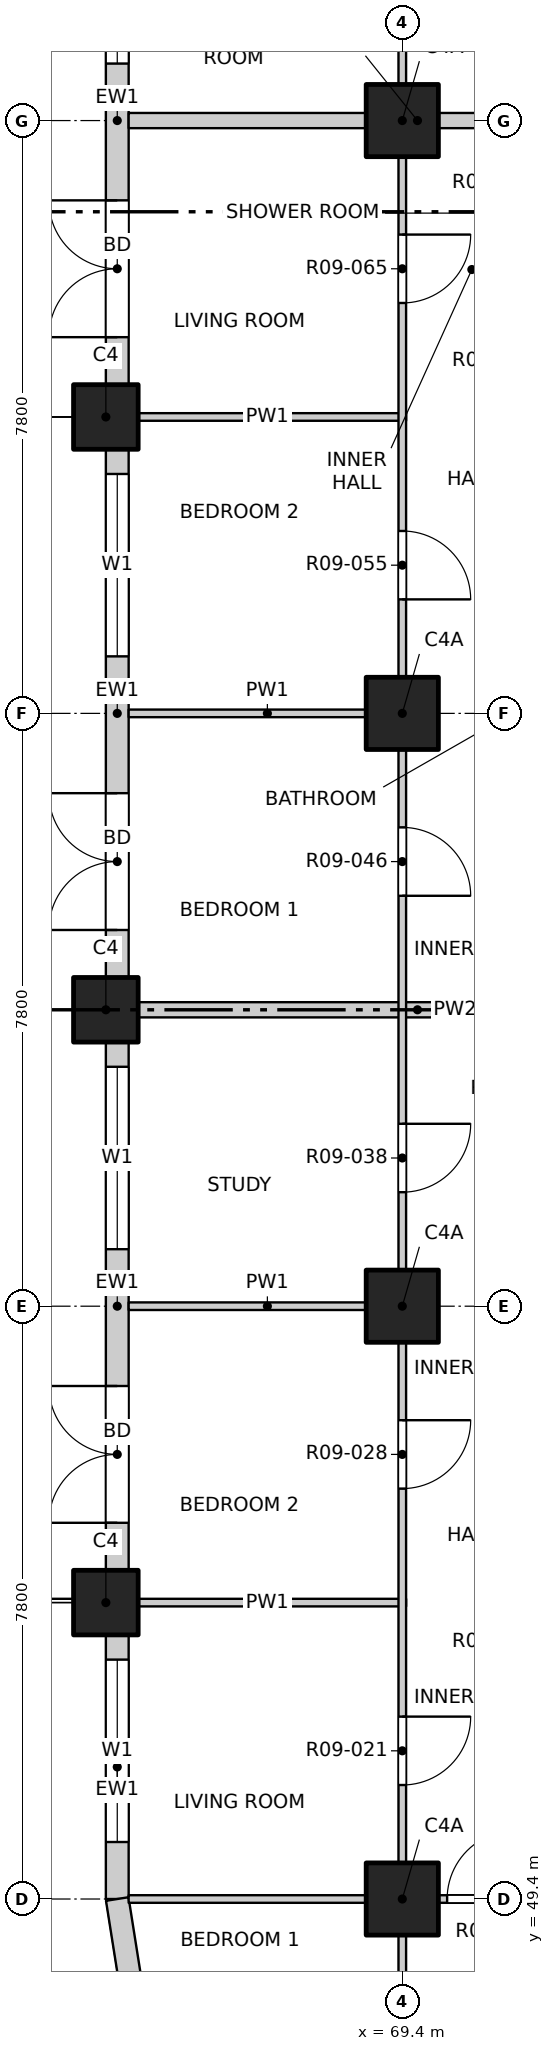
"""IFC4 building model, lengths in metres.
Left out: names, types, materials, properties, quantities, classifications, styles, units other than length and angle.
Written with IfcOpenShell. Run it as: python <this file> out.ifc"""

import sys

from ifc_helpers import new_model, si_unit, direction, frame, frame_2d, origin, origin_2d, place, context, subcontext, project, spatial, rectangle, extrude, element, fill, save


model = new_model("IFC4")
c1 = context("Model", 3, precision=1e-05, world=origin(), true_north=direction((0.0, 1.0)))
c2 = subcontext(c1, "Body", "Model", "MODEL_VIEW")
j1 = project(units=[si_unit("LENGTHUNIT", "METRE"), si_unit("PLANEANGLEUNIT", "RADIAN")], contexts=[c1])
p1 = place(None, origin())
s1 = spatial("IfcSite", under=j1, at=p1, CompositionType="ELEMENT")
p2 = place(p1, origin())
s2 = spatial("IfcBuilding", under=s1, at=p2, CompositionType="ELEMENT")
p3 = place(p2, frame((0.0, 0.0, 110.1)))
s3 = spatial("IfcBuildingStorey", under=s2, at=p3, CompositionType="ELEMENT", Elevation=110.1)
for number, where, z_axis, x_axis in (
    (1, (65.5, 53.3, -0.25), (0.0, 0.0, 1.0), (1.0, 0.0, 0.0)),
    (2, (65.5, 61.1, -0.25), (0.0, 0.0, 1.0), (1.0, 0.0, 0.0)),
    (3, (65.5, 68.9, -0.25), (0.0, 0.0, 1.0), (1.0, 0.0, 0.0)),
):
    element("IfcColumn", number, at=place(p3, frame(where, z_axis=z_axis, x_axis=x_axis)), inside=s3, PredefinedType="COLUMN", context=c2, shape_type="SweptSolid", body=[
        extrude(rectangle(XDim=0.85, YDim=0.85, at=origin_2d()), origin(), (0.0, 0.0, 1.0), 3.4),
    ])
for number, where, z_axis, x_axis in (
    (4, (69.4, 49.4, -0.25), (0.0, 0.0, 1.0), (1.0, 0.0, 0.0)),
    (5, (69.4, 57.2, -0.25), (0.0, 0.0, 1.0), (1.0, 0.0, 0.0)),
    (6, (69.4, 65.0, -0.25), (0.0, 0.0, 1.0), (1.0, 0.0, 0.0)),
    (7, (69.4, 72.8, -0.25), (0.0, 0.0, 1.0), (1.0, 0.0, 0.0)),
):
    element("IfcColumn", number, at=place(p3, frame(where, z_axis=z_axis, x_axis=x_axis)), inside=s3, PredefinedType="COLUMN", context=c2, shape_type="SweptSolid", body=[
        extrude(rectangle(XDim=0.95, YDim=0.95, at=origin_2d()), origin(), (0.0, 0.0, 1.0), 3.4),
    ])
p4 = place(p3, frame((65.65, 49.4, 0.0), z_axis=(0.0, 0.0, 1.0), x_axis=(0.0, 1.0, 0.0)))
e8 = element("IfcWall", 8, at=p4, inside=s3, PredefinedType="SOLIDWALL", context=c2, shape_type="SweptSolid", body=[
    extrude(rectangle(XDim=3.475, YDim=0.3, at=frame_2d((1.738, 0.0))), origin(), (0.0, 0.0, 1.0), 2.7),
])
p5 = place(p4, frame((0.75, 0.0, 0.9)))
e9 = element("IfcOpeningElement", 9, at=p5, cuts=e8, PredefinedType="OPENING", context=c2, shape_type="SweptSolid", body=[
    extrude(rectangle(XDim=2.4, YDim=1.8, at=frame_2d((1.2, 0.9))), frame((0.0, 0.16, 0.0), z_axis=(0.0, -1.0, 0.0), x_axis=(1.0, 0.0, 0.0)), (0.0, 0.0, 1.0), 0.32),
])
p6 = place(p3, frame((65.65, 53.725, 0.0), z_axis=(0.0, 0.0, 1.0), x_axis=(0.0, 1.0, 0.0)))
e10 = element("IfcWall", 10, at=p6, inside=s3, PredefinedType="SOLIDWALL", context=c2, shape_type="SweptSolid", body=[
    extrude(rectangle(XDim=6.95, YDim=0.3, at=frame_2d((3.475, 0.0))), origin(), (0.0, 0.0, 1.0), 2.7),
])
p7 = place(p6, frame((0.625, 0.0, 0.0)))
e11 = element("IfcOpeningElement", 11, at=p7, cuts=e10, PredefinedType="OPENING", context=c2, shape_type="SweptSolid", body=[
    extrude(rectangle(XDim=1.8, YDim=2.4, at=frame_2d((0.9, 1.2))), frame((0.0, 0.16, 0.0), z_axis=(0.0, -1.0, 0.0), x_axis=(1.0, 0.0, 0.0)), (0.0, 0.0, 1.0), 0.32),
])
p8 = place(p6, frame((4.225, 0.0, 0.9)))
e12 = element("IfcOpeningElement", 12, at=p8, cuts=e10, PredefinedType="OPENING", context=c2, shape_type="SweptSolid", body=[
    extrude(rectangle(XDim=2.4, YDim=1.8, at=frame_2d((1.2, 0.9))), frame((0.0, 0.16, 0.0), z_axis=(0.0, -1.0, 0.0), x_axis=(1.0, 0.0, 0.0)), (0.0, 0.0, 1.0), 0.32),
])
p9 = place(p3, frame((65.65, 61.525, 0.0), z_axis=(0.0, 0.0, 1.0), x_axis=(0.0, 1.0, 0.0)))
e13 = element("IfcWall", 13, at=p9, inside=s3, PredefinedType="SOLIDWALL", context=c2, shape_type="SweptSolid", body=[
    extrude(rectangle(XDim=6.95, YDim=0.3, at=frame_2d((3.475, 0.0))), origin(), (0.0, 0.0, 1.0), 2.7),
])
p10 = place(p9, frame((0.625, 0.0, 0.0)))
e14 = element("IfcOpeningElement", 14, at=p10, cuts=e13, PredefinedType="OPENING", context=c2, shape_type="SweptSolid", body=[
    extrude(rectangle(XDim=1.8, YDim=2.4, at=frame_2d((0.9, 1.2))), frame((0.0, 0.16, 0.0), z_axis=(0.0, -1.0, 0.0), x_axis=(1.0, 0.0, 0.0)), (0.0, 0.0, 1.0), 0.32),
])
p11 = place(p9, frame((4.225, 0.0, 0.9)))
e15 = element("IfcOpeningElement", 15, at=p11, cuts=e13, PredefinedType="OPENING", context=c2, shape_type="SweptSolid", body=[
    extrude(rectangle(XDim=2.4, YDim=1.8, at=frame_2d((1.2, 0.9))), frame((0.0, 0.16, 0.0), z_axis=(0.0, -1.0, 0.0), x_axis=(1.0, 0.0, 0.0)), (0.0, 0.0, 1.0), 0.32),
])
p12 = place(p3, frame((65.65, 69.325, 0.0), z_axis=(0.0, 0.0, 1.0), x_axis=(0.0, 1.0, 0.0)))
e16 = element("IfcWall", 16, at=p12, inside=s3, PredefinedType="SOLIDWALL", context=c2, shape_type="SweptSolid", body=[
    extrude(rectangle(XDim=6.95, YDim=0.3, at=frame_2d((3.475, 0.0))), origin(), (0.0, 0.0, 1.0), 2.7),
])
p13 = place(p12, frame((0.625, 0.0, 0.0)))
e17 = element("IfcOpeningElement", 17, at=p13, cuts=e16, PredefinedType="OPENING", context=c2, shape_type="SweptSolid", body=[
    extrude(rectangle(XDim=1.8, YDim=2.4, at=frame_2d((0.9, 1.2))), frame((0.0, 0.16, 0.0), z_axis=(0.0, -1.0, 0.0), x_axis=(1.0, 0.0, 0.0)), (0.0, 0.0, 1.0), 0.32),
])
p14 = place(p12, frame((4.225, 0.0, 0.9)))
e18 = element("IfcOpeningElement", 18, at=p14, cuts=e16, PredefinedType="OPENING", context=c2, shape_type="SweptSolid", body=[
    extrude(rectangle(XDim=2.4, YDim=1.8, at=frame_2d((1.2, 0.9))), frame((0.0, 0.16, 0.0), z_axis=(0.0, -1.0, 0.0), x_axis=(1.0, 0.0, 0.0)), (0.0, 0.0, 1.0), 0.32),
])
p15 = place(p3, frame((65.65, 49.4, 0.0), z_axis=(0.0, 0.0, 1.0), x_axis=(0.156496880861, -0.987678452879, 0.0)))
e19 = element("IfcWall", 19, at=p15, inside=s3, PredefinedType="SOLIDWALL", context=c2, shape_type="SweptSolid", body=[
    extrude(rectangle(XDim=1.173, YDim=0.3, at=frame_2d((0.586, 0.0))), origin(), (0.0, 0.0, 1.0), 2.7),
])
p16 = place(p3, frame((65.8, 49.4, 0.0), z_axis=(0.0, 0.0, 1.0), x_axis=(1.0, 0.0, 0.0)))
e20 = element("IfcWall", 20, at=p16, inside=s3, PredefinedType="PARTITIONING", context=c2, shape_type="SweptSolid", body=[
    extrude(rectangle(XDim=38.4, YDim=0.1, at=frame_2d((19.2, 0.0))), origin(), (0.0, 0.0, 1.0), 3.15),
])
p17 = place(p16, frame((4.19, 0.0, 0.0)))
e21 = element("IfcOpeningElement", 21, at=p17, cuts=e20, PredefinedType="OPENING", context=c2, shape_type="SweptSolid", body=[
    extrude(rectangle(XDim=0.9, YDim=2.1, at=frame_2d((0.45, 1.05))), frame((0.0, 0.06, 0.0), z_axis=(0.0, -1.0, 0.0), x_axis=(1.0, 0.0, 0.0)), (0.0, 0.0, 1.0), 0.12),
])
p18 = place(p16, frame((9.0, 0.0, 0.0)))
e22 = element("IfcOpeningElement", 22, at=p18, cuts=e20, PredefinedType="OPENING", context=c2, shape_type="SweptSolid", body=[
    extrude(rectangle(XDim=0.9, YDim=2.1, at=frame_2d((0.45, 1.05))), frame((0.0, 0.06, 0.0), z_axis=(0.0, -1.0, 0.0), x_axis=(1.0, 0.0, 0.0)), (0.0, 0.0, 1.0), 0.12),
])
p19 = place(p16, frame((12.9, 0.0, 0.0)))
e23 = element("IfcOpeningElement", 23, at=p19, cuts=e20, PredefinedType="OPENING", context=c2, shape_type="SweptSolid", body=[
    extrude(rectangle(XDim=0.9, YDim=2.1, at=frame_2d((0.45, 1.05))), frame((0.0, 0.06, 0.0), z_axis=(0.0, -1.0, 0.0), x_axis=(1.0, 0.0, 0.0)), (0.0, 0.0, 1.0), 0.12),
])
p20 = place(p16, frame((16.8, 0.0, 0.0)))
e24 = element("IfcOpeningElement", 24, at=p20, cuts=e20, PredefinedType="OPENING", context=c2, shape_type="SweptSolid", body=[
    extrude(rectangle(XDim=0.9, YDim=2.1, at=frame_2d((0.45, 1.05))), frame((0.0, 0.06, 0.0), z_axis=(0.0, -1.0, 0.0), x_axis=(1.0, 0.0, 0.0)), (0.0, 0.0, 1.0), 0.12),
])
p21 = place(p16, frame((20.7, 0.0, 0.0)))
e25 = element("IfcOpeningElement", 25, at=p21, cuts=e20, PredefinedType="OPENING", context=c2, shape_type="SweptSolid", body=[
    extrude(rectangle(XDim=0.9, YDim=2.1, at=frame_2d((0.45, 1.05))), frame((0.0, 0.06, 0.0), z_axis=(0.0, -1.0, 0.0), x_axis=(1.0, 0.0, 0.0)), (0.0, 0.0, 1.0), 0.12),
])
p22 = place(p16, frame((24.6, 0.0, 0.0)))
e26 = element("IfcOpeningElement", 26, at=p22, cuts=e20, PredefinedType="OPENING", context=c2, shape_type="SweptSolid", body=[
    extrude(rectangle(XDim=0.9, YDim=2.1, at=frame_2d((0.45, 1.05))), frame((0.0, 0.06, 0.0), z_axis=(0.0, -1.0, 0.0), x_axis=(1.0, 0.0, 0.0)), (0.0, 0.0, 1.0), 0.12),
])
p23 = place(p16, frame((28.5, 0.0, 0.0)))
e27 = element("IfcOpeningElement", 27, at=p23, cuts=e20, PredefinedType="OPENING", context=c2, shape_type="SweptSolid", body=[
    extrude(rectangle(XDim=0.9, YDim=2.1, at=frame_2d((0.45, 1.05))), frame((0.0, 0.06, 0.0), z_axis=(0.0, -1.0, 0.0), x_axis=(1.0, 0.0, 0.0)), (0.0, 0.0, 1.0), 0.12),
])
p24 = place(p16, frame((33.31, 0.0, 0.0)))
e28 = element("IfcOpeningElement", 28, at=p24, cuts=e20, PredefinedType="OPENING", context=c2, shape_type="SweptSolid", body=[
    extrude(rectangle(XDim=0.9, YDim=2.1, at=frame_2d((0.45, 1.05))), frame((0.0, 0.06, 0.0), z_axis=(0.0, -1.0, 0.0), x_axis=(1.0, 0.0, 0.0)), (0.0, 0.0, 1.0), 0.12),
])
for number, where, z_axis, x_axis in (
    (29, (65.8, 53.3, 0.0), (0.0, 0.0, 1.0), (1.0, 0.0, 0.0)),
    (30, (65.8, 57.2, 0.0), (0.0, 0.0, 1.0), (1.0, 0.0, 0.0)),
):
    element("IfcWall", number, at=place(p3, frame(where, z_axis=z_axis, x_axis=x_axis)), inside=s3, PredefinedType="PARTITIONING", context=c2, shape_type="SweptSolid", body=[
        extrude(rectangle(XDim=3.65, YDim=0.1, at=frame_2d((1.825, 0.0))), origin(), (0.0, 0.0, 1.0), 3.15),
    ])
p25 = place(p3, frame((65.8, 61.1, 0.0), z_axis=(0.0, 0.0, 1.0), x_axis=(1.0, 0.0, 0.0)))
e31 = element("IfcWall", 31, at=p25, inside=s3, PredefinedType="PARTITIONING", context=c2, shape_type="SweptSolid", body=[
    extrude(rectangle(XDim=7.6, YDim=0.2, at=frame_2d((3.8, 0.0))), origin(), (0.0, 0.0, 1.0), 2.55),
])
p26 = place(p3, frame((65.8, 65.0, 0.0), z_axis=(0.0, 0.0, 1.0), x_axis=(1.0, 0.0, 0.0)))
e32 = element("IfcWall", 32, at=p26, inside=s3, PredefinedType="PARTITIONING", context=c2, shape_type="SweptSolid", body=[
    extrude(rectangle(XDim=3.65, YDim=0.1, at=frame_2d((1.825, 0.0))), origin(), (0.0, 0.0, 1.0), 3.15),
])
p27 = place(p3, frame((65.8, 68.9, 0.0), z_axis=(0.0, 0.0, 1.0), x_axis=(1.0, 0.0, 0.0)))
e33 = element("IfcWall", 33, at=p27, inside=s3, PredefinedType="PARTITIONING", context=c2, shape_type="SweptSolid", body=[
    extrude(rectangle(XDim=3.65, YDim=0.1, at=frame_2d((1.825, 0.0))), origin(), (0.0, 0.0, 1.0), 2.55),
])
p28 = place(p3, frame((65.8, 72.8, 0.0), z_axis=(0.0, 0.0, 1.0), x_axis=(1.0, 0.0, 0.0)))
e34 = element("IfcWall", 34, at=p28, inside=s3, PredefinedType="PARTITIONING", context=c2, shape_type="SweptSolid", body=[
    extrude(rectangle(XDim=7.6, YDim=0.2, at=frame_2d((3.8, 0.0))), origin(), (0.0, 0.0, 1.0), 3.15),
])
p29 = place(p3, frame((69.4, 45.8, 0.0), z_axis=(0.0, 0.0, 1.0), x_axis=(0.0, 1.0, 0.0)))
e35 = element("IfcWall", 35, at=p29, inside=s3, PredefinedType="PARTITIONING", context=c2, shape_type="SweptSolid", body=[
    extrude(rectangle(XDim=38.4, YDim=0.1, at=frame_2d((19.2, 0.0))), origin(), (0.0, 0.0, 1.0), 3.15),
])
p30 = place(p29, frame((1.05, 0.0, 0.0)))
e36 = element("IfcOpeningElement", 36, at=p30, cuts=e35, PredefinedType="OPENING", context=c2, shape_type="SweptSolid", body=[
    extrude(rectangle(XDim=1.2, YDim=2.1, at=frame_2d((0.6, 1.05))), frame((0.0, 0.06, 0.0), z_axis=(0.0, -1.0, 0.0), x_axis=(1.0, 0.0, 0.0)), (0.0, 0.0, 1.0), 0.12),
])
p31 = place(p29, frame((5.1, 0.0, 0.0)))
e37 = element("IfcOpeningElement", 37, at=p31, cuts=e35, PredefinedType="OPENING", context=c2, shape_type="SweptSolid", body=[
    extrude(rectangle(XDim=0.9, YDim=2.1, at=frame_2d((0.45, 1.05))), frame((0.0, 0.06, 0.0), z_axis=(0.0, -1.0, 0.0), x_axis=(1.0, 0.0, 0.0)), (0.0, 0.0, 1.0), 0.12),
])
p32 = place(p29, frame((9.0, 0.0, 0.0)))
e38 = element("IfcOpeningElement", 38, at=p32, cuts=e35, PredefinedType="OPENING", context=c2, shape_type="SweptSolid", body=[
    extrude(rectangle(XDim=0.9, YDim=2.1, at=frame_2d((0.45, 1.05))), frame((0.0, 0.06, 0.0), z_axis=(0.0, -1.0, 0.0), x_axis=(1.0, 0.0, 0.0)), (0.0, 0.0, 1.0), 0.12),
])
p33 = place(p29, frame((12.9, 0.0, 0.0)))
e39 = element("IfcOpeningElement", 39, at=p33, cuts=e35, PredefinedType="OPENING", context=c2, shape_type="SweptSolid", body=[
    extrude(rectangle(XDim=0.9, YDim=2.1, at=frame_2d((0.45, 1.05))), frame((0.0, 0.06, 0.0), z_axis=(0.0, -1.0, 0.0), x_axis=(1.0, 0.0, 0.0)), (0.0, 0.0, 1.0), 0.12),
])
p34 = place(p29, frame((16.8, 0.0, 0.0)))
e40 = element("IfcOpeningElement", 40, at=p34, cuts=e35, PredefinedType="OPENING", context=c2, shape_type="SweptSolid", body=[
    extrude(rectangle(XDim=0.9, YDim=2.1, at=frame_2d((0.45, 1.05))), frame((0.0, 0.06, 0.0), z_axis=(0.0, -1.0, 0.0), x_axis=(1.0, 0.0, 0.0)), (0.0, 0.0, 1.0), 0.12),
])
p35 = place(p29, frame((20.7, 0.0, 0.0)))
e41 = element("IfcOpeningElement", 41, at=p35, cuts=e35, PredefinedType="OPENING", context=c2, shape_type="SweptSolid", body=[
    extrude(rectangle(XDim=0.9, YDim=2.1, at=frame_2d((0.45, 1.05))), frame((0.0, 0.06, 0.0), z_axis=(0.0, -1.0, 0.0), x_axis=(1.0, 0.0, 0.0)), (0.0, 0.0, 1.0), 0.12),
])
p36 = place(p29, frame((24.6, 0.0, 0.0)))
e42 = element("IfcOpeningElement", 42, at=p36, cuts=e35, PredefinedType="OPENING", context=c2, shape_type="SweptSolid", body=[
    extrude(rectangle(XDim=0.9, YDim=2.1, at=frame_2d((0.45, 1.05))), frame((0.0, 0.06, 0.0), z_axis=(0.0, -1.0, 0.0), x_axis=(1.0, 0.0, 0.0)), (0.0, 0.0, 1.0), 0.12),
])
p37 = place(p29, frame((28.5, 0.0, 0.0)))
e43 = element("IfcOpeningElement", 43, at=p37, cuts=e35, PredefinedType="OPENING", context=c2, shape_type="SweptSolid", body=[
    extrude(rectangle(XDim=0.9, YDim=2.1, at=frame_2d((0.45, 1.05))), frame((0.0, 0.06, 0.0), z_axis=(0.0, -1.0, 0.0), x_axis=(1.0, 0.0, 0.0)), (0.0, 0.0, 1.0), 0.12),
])
p38 = place(p29, frame((32.4, 0.0, 0.0)))
e44 = element("IfcOpeningElement", 44, at=p38, cuts=e35, PredefinedType="OPENING", context=c2, shape_type="SweptSolid", body=[
    extrude(rectangle(XDim=0.9, YDim=2.1, at=frame_2d((0.45, 1.05))), frame((0.0, 0.06, 0.0), z_axis=(0.0, -1.0, 0.0), x_axis=(1.0, 0.0, 0.0)), (0.0, 0.0, 1.0), 0.12),
])
p39 = place(p29, frame((36.15, 0.0, 0.0)))
e45 = element("IfcOpeningElement", 45, at=p39, cuts=e35, PredefinedType="OPENING", context=c2, shape_type="SweptSolid", body=[
    extrude(rectangle(XDim=1.2, YDim=2.1, at=frame_2d((0.6, 1.05))), frame((0.0, 0.06, 0.0), z_axis=(0.0, -1.0, 0.0), x_axis=(1.0, 0.0, 0.0)), (0.0, 0.0, 1.0), 0.12),
])
p40 = place(p5, origin())
e46 = element("IfcWindow", 46, at=p40, inside=s3, PartitioningType="DOUBLE_PANEL_VERTICAL", PredefinedType="WINDOW", context=c2, shape_type="SweptSolid", body=[
    extrude(rectangle(XDim=2.4, YDim=1.8, at=frame_2d((1.2, 0.9))), frame((0.0, 0.03, 0.0), z_axis=(0.0, -1.0, 0.0), x_axis=(1.0, 0.0, 0.0)), (0.0, 0.0, 1.0), 0.06),
])
fill(e9, e46)
p41 = place(p7, origin())
e47 = element("IfcDoor", 47, at=p41, inside=s3, OperationType="DOUBLE_DOOR_SINGLE_SWING", PredefinedType="DOOR", context=c2, shape_type="SweptSolid", body=[
    extrude(rectangle(XDim=1.8, YDim=2.4, at=frame_2d((0.9, 1.2))), frame((0.0, 0.025, 0.0), z_axis=(0.0, -1.0, 0.0), x_axis=(1.0, 0.0, 0.0)), (0.0, 0.0, 1.0), 0.05),
])
fill(e11, e47)
p42 = place(p8, origin())
e48 = element("IfcWindow", 48, at=p42, inside=s3, PartitioningType="DOUBLE_PANEL_VERTICAL", PredefinedType="WINDOW", context=c2, shape_type="SweptSolid", body=[
    extrude(rectangle(XDim=2.4, YDim=1.8, at=frame_2d((1.2, 0.9))), frame((0.0, 0.03, 0.0), z_axis=(0.0, -1.0, 0.0), x_axis=(1.0, 0.0, 0.0)), (0.0, 0.0, 1.0), 0.06),
])
fill(e12, e48)
p43 = place(p10, origin())
e49 = element("IfcDoor", 49, at=p43, inside=s3, OperationType="DOUBLE_DOOR_SINGLE_SWING", PredefinedType="DOOR", context=c2, shape_type="SweptSolid", body=[
    extrude(rectangle(XDim=1.8, YDim=2.4, at=frame_2d((0.9, 1.2))), frame((0.0, 0.025, 0.0), z_axis=(0.0, -1.0, 0.0), x_axis=(1.0, 0.0, 0.0)), (0.0, 0.0, 1.0), 0.05),
])
fill(e14, e49)
p44 = place(p11, origin())
e50 = element("IfcWindow", 50, at=p44, inside=s3, PartitioningType="DOUBLE_PANEL_VERTICAL", PredefinedType="WINDOW", context=c2, shape_type="SweptSolid", body=[
    extrude(rectangle(XDim=2.4, YDim=1.8, at=frame_2d((1.2, 0.9))), frame((0.0, 0.03, 0.0), z_axis=(0.0, -1.0, 0.0), x_axis=(1.0, 0.0, 0.0)), (0.0, 0.0, 1.0), 0.06),
])
fill(e15, e50)
p45 = place(p13, origin())
e51 = element("IfcDoor", 51, at=p45, inside=s3, OperationType="DOUBLE_DOOR_SINGLE_SWING", PredefinedType="DOOR", context=c2, shape_type="SweptSolid", body=[
    extrude(rectangle(XDim=1.8, YDim=2.4, at=frame_2d((0.9, 1.2))), frame((0.0, 0.025, 0.0), z_axis=(0.0, -1.0, 0.0), x_axis=(1.0, 0.0, 0.0)), (0.0, 0.0, 1.0), 0.05),
])
fill(e17, e51)
p46 = place(p14, origin())
e52 = element("IfcWindow", 52, at=p46, inside=s3, PartitioningType="DOUBLE_PANEL_VERTICAL", PredefinedType="WINDOW", context=c2, shape_type="SweptSolid", body=[
    extrude(rectangle(XDim=2.4, YDim=1.8, at=frame_2d((1.2, 0.9))), frame((0.0, 0.03, 0.0), z_axis=(0.0, -1.0, 0.0), x_axis=(1.0, 0.0, 0.0)), (0.0, 0.0, 1.0), 0.06),
])
fill(e18, e52)
p47 = place(p17, origin())
e53 = element("IfcDoor", 53, at=p47, inside=s3, OperationType="SINGLE_SWING_RIGHT", PredefinedType="DOOR", context=c2, shape_type="SweptSolid", body=[
    extrude(rectangle(XDim=0.9, YDim=2.1, at=frame_2d((0.45, 1.05))), frame((0.0, 0.025, 0.0), z_axis=(0.0, -1.0, 0.0), x_axis=(1.0, 0.0, 0.0)), (0.0, 0.0, 1.0), 0.05),
])
fill(e21, e53)
p48 = place(p31, origin())
e54 = element("IfcDoor", 54, at=p48, inside=s3, OperationType="SINGLE_SWING_LEFT", PredefinedType="DOOR", context=c2, shape_type="SweptSolid", body=[
    extrude(rectangle(XDim=0.9, YDim=2.1, at=frame_2d((0.45, 1.05))), frame((0.0, 0.025, 0.0), z_axis=(0.0, -1.0, 0.0), x_axis=(1.0, 0.0, 0.0)), (0.0, 0.0, 1.0), 0.05),
])
fill(e37, e54)
p49 = place(p32, origin())
e55 = element("IfcDoor", 55, at=p49, inside=s3, OperationType="SINGLE_SWING_LEFT", PredefinedType="DOOR", context=c2, shape_type="SweptSolid", body=[
    extrude(rectangle(XDim=0.9, YDim=2.1, at=frame_2d((0.45, 1.05))), frame((0.0, 0.025, 0.0), z_axis=(0.0, -1.0, 0.0), x_axis=(1.0, 0.0, 0.0)), (0.0, 0.0, 1.0), 0.05),
])
fill(e38, e55)
p50 = place(p33, origin())
e56 = element("IfcDoor", 56, at=p50, inside=s3, OperationType="SINGLE_SWING_LEFT", PredefinedType="DOOR", context=c2, shape_type="SweptSolid", body=[
    extrude(rectangle(XDim=0.9, YDim=2.1, at=frame_2d((0.45, 1.05))), frame((0.0, 0.025, 0.0), z_axis=(0.0, -1.0, 0.0), x_axis=(1.0, 0.0, 0.0)), (0.0, 0.0, 1.0), 0.05),
])
fill(e39, e56)
p51 = place(p34, origin())
e57 = element("IfcDoor", 57, at=p51, inside=s3, OperationType="SINGLE_SWING_RIGHT", PredefinedType="DOOR", context=c2, shape_type="SweptSolid", body=[
    extrude(rectangle(XDim=0.9, YDim=2.1, at=frame_2d((0.45, 1.05))), frame((0.0, 0.025, 0.0), z_axis=(0.0, -1.0, 0.0), x_axis=(1.0, 0.0, 0.0)), (0.0, 0.0, 1.0), 0.05),
])
fill(e40, e57)
p52 = place(p35, origin())
e58 = element("IfcDoor", 58, at=p52, inside=s3, OperationType="SINGLE_SWING_RIGHT", PredefinedType="DOOR", context=c2, shape_type="SweptSolid", body=[
    extrude(rectangle(XDim=0.9, YDim=2.1, at=frame_2d((0.45, 1.05))), frame((0.0, 0.025, 0.0), z_axis=(0.0, -1.0, 0.0), x_axis=(1.0, 0.0, 0.0)), (0.0, 0.0, 1.0), 0.05),
])
fill(e41, e58)
p53 = place(p36, origin())
e59 = element("IfcDoor", 59, at=p53, inside=s3, OperationType="SINGLE_SWING_LEFT", PredefinedType="DOOR", context=c2, shape_type="SweptSolid", body=[
    extrude(rectangle(XDim=0.9, YDim=2.1, at=frame_2d((0.45, 1.05))), frame((0.0, 0.025, 0.0), z_axis=(0.0, -1.0, 0.0), x_axis=(1.0, 0.0, 0.0)), (0.0, 0.0, 1.0), 0.05),
])
fill(e42, e59)
save(model, sys.argv[1])
